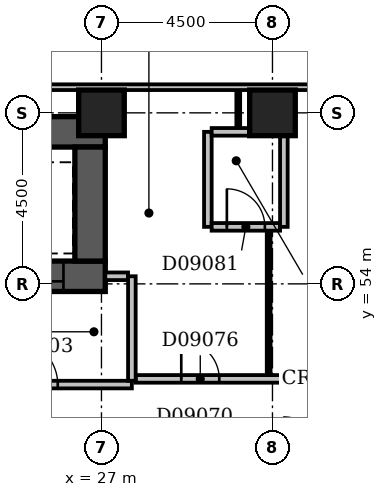
"""IFC4 building model, lengths in metres.
Left out: names, types, materials, properties, quantities, classifications, styles, units other than length and angle.
Written with IfcOpenShell. Run it as: python <this file> out.ifc"""

import sys

from ifc_helpers import new_model, si_unit, direction, frame, frame_2d, origin, origin_2d, place, context, subcontext, project, spatial, rectangle, extrude, element, fill, save


model = new_model("IFC4")
c1 = context("Model", 3, precision=1e-05, world=origin(), true_north=direction((0.0, 1.0)))
c2 = subcontext(c1, "Body", "Model", "MODEL_VIEW")
j1 = project(units=[si_unit("LENGTHUNIT", "METRE"), si_unit("PLANEANGLEUNIT", "RADIAN")], contexts=[c1])
p1 = place(None, origin())
s1 = spatial("IfcSite", under=j1, at=p1, CompositionType="ELEMENT")
p2 = place(p1, origin())
s2 = spatial("IfcBuilding", under=s1, at=p2, CompositionType="ELEMENT")
p3 = place(p2, frame((0.0, 0.0, 43.4)))
s3 = spatial("IfcBuildingStorey", under=s2, at=p3, CompositionType="ELEMENT", Elevation=43.4)
p4 = place(p3, frame((23.8, 54.2, -0.3), z_axis=(0.0, 0.0, 1.0), x_axis=(1.0, 0.0, 0.0)))
e1 = element("IfcWall", 1, at=p4, inside=s3, PredefinedType="SHEAR", context=c2, shape_type="SweptSolid", body=[
    extrude(rectangle(XDim=3.3, YDim=0.8, at=frame_2d((1.65, 0.0))), origin(), (0.0, 0.0, 1.0), 3.6),
])
p5 = place(p4, frame((1.1, 0.0, 0.3)))
e2 = element("IfcOpeningElement", 2, at=p5, cuts=e1, PredefinedType="OPENING", context=c2, shape_type="SweptSolid", body=[
    extrude(rectangle(XDim=1.1, YDim=2.1, at=frame_2d((0.55, 1.05))), frame((0.0, 0.412, 0.0), z_axis=(0.0, -1.0, 0.0), x_axis=(1.0, 0.0, 0.0)), (0.0, 0.0, 1.0), 0.824),
])
p6 = place(p3, frame((23.8, 58.0, -0.3), z_axis=(0.0, 0.0, 1.0), x_axis=(1.0, 0.0, 0.0)))
e3 = element("IfcWall", 3, at=p6, inside=s3, PredefinedType="SHEAR", context=c2, shape_type="SweptSolid", body=[
    extrude(rectangle(XDim=3.3, YDim=0.8, at=frame_2d((1.65, 0.0))), origin(), (0.0, 0.0, 1.0), 3.6),
])
p7 = place(p3, frame((26.7, 54.6, -0.3), z_axis=(0.0, 0.0, 1.0), x_axis=(0.0, 1.0, 0.0)))
e4 = element("IfcWall", 4, at=p7, inside=s3, PredefinedType="SHEAR", context=c2, shape_type="SweptSolid", body=[
    extrude(rectangle(XDim=3.0, YDim=0.8, at=frame_2d((1.5, 0.0))), origin(), (0.0, 0.0, 1.0), 3.6),
])
for number, where, z_axis, x_axis in (
    (5, (27.0, 58.5, -0.3), (0.0, 0.0, 1.0), (1.0, 0.0, 0.0)),
    (6, (31.5, 58.5, -0.3), (0.0, 0.0, 1.0), (1.0, 0.0, 0.0)),
):
    element("IfcColumn", number, at=place(p3, frame(where, z_axis=z_axis, x_axis=x_axis)), inside=s3, PredefinedType="COLUMN", context=c2, shape_type="SweptSolid", body=[
        extrude(rectangle(XDim=1.2, YDim=1.2, at=origin_2d()), origin(), (0.0, 0.0, 1.0), 3.6),
    ])
p8 = place(p3, frame((68.1, 59.175, 0.0), z_axis=(0.0, 0.0, 1.0), x_axis=(-1.0, 0.0, 0.0)))
e7 = element("IfcWall", 7, at=p8, inside=s3, PredefinedType="STANDARD", context=c2, shape_type="SweptSolid", body=[
    extrude(rectangle(XDim=68.85, YDim=0.15, at=frame_2d((34.425, 0.0))), origin(), (0.0, 0.0, 1.0), 2.7),
])
p9 = place(p8, frame((1.523, 0.0, 0.6)))
e8 = element("IfcOpeningElement", 8, at=p9, cuts=e7, PredefinedType="OPENING", context=c2, shape_type="SweptSolid", body=[
    extrude(rectangle(XDim=1.2, YDim=1.8, at=frame_2d((0.6, 0.9))), frame((0.0, 0.087, 0.0), z_axis=(0.0, -1.0, 0.0), x_axis=(1.0, 0.0, 0.0)), (0.0, 0.0, 1.0), 0.174),
])
p10 = place(p8, frame((6.15, 0.0, 0.6)))
e9 = element("IfcOpeningElement", 9, at=p10, cuts=e7, PredefinedType="OPENING", context=c2, shape_type="SweptSolid", body=[
    extrude(rectangle(XDim=2.4, YDim=1.8, at=frame_2d((1.2, 0.9))), frame((0.0, 0.087, 0.0), z_axis=(0.0, -1.0, 0.0), x_axis=(1.0, 0.0, 0.0)), (0.0, 0.0, 1.0), 0.174),
])
p11 = place(p3, frame((23.0, 51.35, 0.0), z_axis=(0.0, 0.0, 1.0), x_axis=(1.0, 0.0, 0.0)))
e10 = element("IfcWall", 10, at=p11, inside=s3, PredefinedType="PARTITIONING", context=c2, shape_type="SweptSolid", body=[
    extrude(rectangle(XDim=4.8, YDim=0.2, at=frame_2d((2.4, 0.0))), origin(), (0.0, 0.0, 1.0), 3.3),
])
p12 = place(p11, frame((1.65, 0.0, 0.0)))
e11 = element("IfcOpeningElement", 11, at=p12, cuts=e10, PredefinedType="OPENING", context=c2, shape_type="SweptSolid", body=[
    extrude(rectangle(XDim=1.2, YDim=2.1, at=frame_2d((0.6, 1.05))), frame((0.0, 0.112, 0.0), z_axis=(0.0, -1.0, 0.0), x_axis=(1.0, 0.0, 0.0)), (0.0, 0.0, 1.0), 0.224),
])
p13 = place(p3, frame((27.8, 51.45, 0.0), z_axis=(0.0, 0.0, 1.0), x_axis=(0.0, 1.0, 0.0)))
e12 = element("IfcWall", 12, at=p13, inside=s3, PredefinedType="PARTITIONING", context=c2, shape_type="SweptSolid", body=[
    extrude(rectangle(XDim=2.75, YDim=0.2, at=frame_2d((1.375, 0.0))), origin(), (0.0, 0.0, 1.0), 3.3),
])
p14 = place(p3, frame((27.1, 54.2, 0.0), z_axis=(0.0, 0.0, 1.0), x_axis=(1.0, 0.0, 0.0)))
e13 = element("IfcWall", 13, at=p14, inside=s3, PredefinedType="PARTITIONING", context=c2, shape_type="SweptSolid", body=[
    extrude(rectangle(XDim=0.6, YDim=0.2, at=frame_2d((0.3, 0.0))), origin(), (0.0, 0.0, 1.0), 3.3),
])
p15 = place(p3, frame((27.9, 51.5, 0.0), z_axis=(0.0, 0.0, 1.0), x_axis=(1.0, 0.0, 0.0)))
e14 = element("IfcWall", 14, at=p15, inside=s3, PredefinedType="PARTITIONING", context=c2, shape_type="SweptSolid", body=[
    extrude(rectangle(XDim=9.3, YDim=0.2, at=frame_2d((4.65, 0.0))), origin(), (0.0, 0.0, 1.0), 3.3),
])
p16 = place(p15, frame((1.2, 0.0, 0.0)))
e15 = element("IfcOpeningElement", 15, at=p16, cuts=e14, PredefinedType="OPENING", context=c2, shape_type="SweptSolid", body=[
    extrude(rectangle(XDim=1.0, YDim=2.1, at=frame_2d((0.5, 1.05))), frame((0.0, 0.112, 0.0), z_axis=(0.0, -1.0, 0.0), x_axis=(1.0, 0.0, 0.0)), (0.0, 0.0, 1.0), 0.224),
])
p17 = place(p15, frame((6.0, 0.0, 0.0)))
e16 = element("IfcOpeningElement", 16, at=p17, cuts=e14, PredefinedType="OPENING", context=c2, shape_type="SweptSolid", body=[
    extrude(rectangle(XDim=0.9, YDim=2.1, at=frame_2d((0.45, 1.05))), frame((0.0, 0.112, 0.0), z_axis=(0.0, -1.0, 0.0), x_axis=(1.0, 0.0, 0.0)), (0.0, 0.0, 1.0), 0.224),
])
p18 = place(p3, frame((31.4, 51.6, 0.0), z_axis=(0.0, 0.0, 1.0), x_axis=(0.0, 1.0, 0.0)))
e17 = element("IfcWall", 17, at=p18, inside=s3, PredefinedType="PARTITIONING", context=c2, shape_type="SweptSolid", body=[
    extrude(rectangle(XDim=3.8, YDim=0.1, at=frame_2d((1.9, 0.0))), origin(), (0.0, 0.0, 1.0), 3.3),
])
p19 = place(p3, frame((29.8, 55.5, 0.0), z_axis=(0.0, 0.0, 1.0), x_axis=(0.0, 1.0, 0.0)))
e18 = element("IfcWall", 18, at=p19, inside=s3, PredefinedType="PARTITIONING", context=c2, shape_type="SweptSolid", body=[
    extrude(rectangle(XDim=2.5, YDim=0.2, at=frame_2d((1.25, 0.0))), origin(), (0.0, 0.0, 1.0), 3.3),
])
p20 = place(p3, frame((29.9, 55.5, 0.0), z_axis=(0.0, 0.0, 1.0), x_axis=(1.0, 0.0, 0.0)))
e19 = element("IfcWall", 19, at=p20, inside=s3, PredefinedType="PARTITIONING", context=c2, shape_type="SweptSolid", body=[
    extrude(rectangle(XDim=1.8, YDim=0.2, at=frame_2d((0.9, 0.0))), origin(), (0.0, 0.0, 1.0), 3.3),
])
p21 = place(p20, frame((0.4, 0.0, 0.0)))
e20 = element("IfcOpeningElement", 20, at=p21, cuts=e19, PredefinedType="OPENING", context=c2, shape_type="SweptSolid", body=[
    extrude(rectangle(XDim=1.0, YDim=2.1, at=frame_2d((0.5, 1.05))), frame((0.0, 0.112, 0.0), z_axis=(0.0, -1.0, 0.0), x_axis=(1.0, 0.0, 0.0)), (0.0, 0.0, 1.0), 0.224),
])
p22 = place(p3, frame((31.8, 55.5, 0.0), z_axis=(0.0, 0.0, 1.0), x_axis=(0.0, 1.0, 0.0)))
e21 = element("IfcWall", 21, at=p22, inside=s3, PredefinedType="PARTITIONING", context=c2, shape_type="SweptSolid", body=[
    extrude(rectangle(XDim=2.5, YDim=0.2, at=frame_2d((1.25, 0.0))), origin(), (0.0, 0.0, 1.0), 3.3),
])
p23 = place(p3, frame((29.9, 58.0, 0.0), z_axis=(0.0, 0.0, 1.0), x_axis=(1.0, 0.0, 0.0)))
e22 = element("IfcWall", 22, at=p23, inside=s3, PredefinedType="PARTITIONING", context=c2, shape_type="SweptSolid", body=[
    extrude(rectangle(XDim=1.8, YDim=0.2, at=frame_2d((0.9, 0.0))), origin(), (0.0, 0.0, 1.0), 3.3),
])
p24 = place(p3, frame((30.6, 58.1, 0.0), z_axis=(0.0, 0.0, 1.0), x_axis=(0.0, 1.0, 0.0)))
e23 = element("IfcWall", 23, at=p24, inside=s3, PredefinedType="PARTITIONING", context=c2, shape_type="SweptSolid", body=[
    extrude(rectangle(XDim=1.0, YDim=0.1, at=frame_2d((0.5, 0.0))), origin(), (0.0, 0.0, 1.0), 3.3),
])
p25 = place(p12, origin())
e24 = element("IfcDoor", 24, at=p25, inside=s3, OperationType="SINGLE_SWING_LEFT", PredefinedType="DOOR", context=c2, shape_type="SweptSolid", body=[
    extrude(rectangle(XDim=1.2, YDim=2.1, at=frame_2d((0.6, 1.05))), frame((0.0, 0.025, 0.0), z_axis=(0.0, -1.0, 0.0), x_axis=(1.0, 0.0, 0.0)), (0.0, 0.0, 1.0), 0.05),
])
fill(e11, e24)
p26 = place(p5, origin())
e25 = element("IfcDoor", 25, at=p26, inside=s3, OperationType="SLIDING_TO_LEFT", PredefinedType="DOOR", context=c2, shape_type="SweptSolid", body=[
    extrude(rectangle(XDim=1.1, YDim=2.1, at=frame_2d((0.55, 1.05))), frame((0.0, 0.025, 0.0), z_axis=(0.0, -1.0, 0.0), x_axis=(1.0, 0.0, 0.0)), (0.0, 0.0, 1.0), 0.05),
])
fill(e2, e25)
p27 = place(p16, origin())
e26 = element("IfcDoor", 26, at=p27, inside=s3, OperationType="SINGLE_SWING_LEFT", PredefinedType="DOOR", context=c2, shape_type="SweptSolid", body=[
    extrude(rectangle(XDim=1.0, YDim=2.1, at=frame_2d((0.5, 1.05))), frame((0.0, 0.025, 0.0), z_axis=(0.0, -1.0, 0.0), x_axis=(1.0, 0.0, 0.0)), (0.0, 0.0, 1.0), 0.05),
])
fill(e15, e26)
p28 = place(p21, origin())
e27 = element("IfcDoor", 27, at=p28, inside=s3, OperationType="SINGLE_SWING_LEFT", PredefinedType="DOOR", context=c2, shape_type="SweptSolid", body=[
    extrude(rectangle(XDim=1.0, YDim=2.1, at=frame_2d((0.5, 1.05))), frame((0.0, 0.025, 0.0), z_axis=(0.0, -1.0, 0.0), x_axis=(1.0, 0.0, 0.0)), (0.0, 0.0, 1.0), 0.05),
])
fill(e20, e27)
save(model, sys.argv[1])
